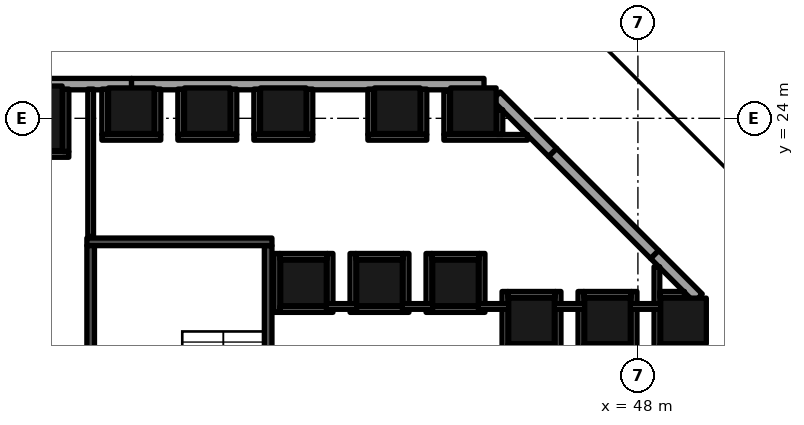
"""IFC4 building model, lengths in metres.
Left out: names, types, materials, properties, quantities, classifications, styles, units other than length and angle.
Written with IfcOpenShell. Run it as: python <this file> out.ifc"""

import sys

from ifc_helpers import new_model, si_unit, direction, frame, frame_2d, origin, origin_2d, place, context, subcontext, project, spatial, rectangle, extrude, element, fill, save


model = new_model("IFC4")
c1 = context("Model", 3, precision=1e-05, world=origin(), true_north=direction((0.0, 1.0)))
c2 = subcontext(c1, "Body", "Model", "MODEL_VIEW")
j1 = project(units=[si_unit("LENGTHUNIT", "METRE"), si_unit("PLANEANGLEUNIT", "RADIAN")], contexts=[c1])
p1 = place(None, origin())
s1 = spatial("IfcSite", under=j1, at=p1, CompositionType="ELEMENT")
p2 = place(p1, origin())
s2 = spatial("IfcBuilding", under=s1, at=p2, CompositionType="ELEMENT")
p3 = place(p2, origin())
s3 = spatial("IfcBuildingStorey", under=s2, at=p3, CompositionType="ELEMENT", Elevation=0.0)
p4 = place(p3, frame((32.0, 24.0, 0.0), z_axis=(0.0, 0.0, 1.0), x_axis=(1.0, 0.0, 0.0)))
e1 = element("IfcColumn", 1, at=p4, inside=s3, PredefinedType="COLUMN", context=c2, shape_type="SweptSolid", body=[
    extrude(rectangle(XDim=1.7, YDim=1.7, at=origin_2d()), origin(), (0.0, 0.0, 1.0), 9.0),
])
for number, where, z_axis, x_axis in (
    (2, (34.669, 24.2, 0.0), (0.0, 0.0, 1.0), (1.0, 0.0, 0.0)),
    (3, (39.2, 19.669, 0.0), (0.0, 0.0, 1.0), (1.0, 0.0, 0.0)),
    (4, (36.669, 24.2, 0.0), (0.0, 0.0, 1.0), (1.0, 0.0, 0.0)),
    (5, (41.2, 19.669, 0.0), (0.0, 0.0, 1.0), (1.0, 0.0, 0.0)),
    (6, (38.669, 24.2, 0.0), (0.0, 0.0, 1.0), (1.0, 0.0, 0.0)),
    (7, (43.2, 19.669, 0.0), (0.0, 0.0, 1.0), (1.0, 0.0, 0.0)),
    (8, (45.2, 18.669, 0.0), (0.0, 0.0, 1.0), (1.0, 0.0, 0.0)),
    (9, (41.669, 24.2, 0.0), (0.0, 0.0, 1.0), (1.0, 0.0, 0.0)),
    (10, (47.2, 18.669, 0.0), (0.0, 0.0, 1.0), (1.0, 0.0, 0.0)),
    (11, (43.669, 24.2, 0.0), (0.0, 0.0, 1.0), (1.0, 0.0, 0.0)),
    (12, (49.2, 18.669, 0.0), (0.0, 0.0, 1.0), (1.0, 0.0, 0.0)),
):
    element("IfcColumn", number, at=place(p3, frame(where, z_axis=z_axis, x_axis=x_axis)), inside=s3, PredefinedType="COLUMN", context=c2, shape_type="SweptSolid", body=[
        extrude(rectangle(XDim=1.2, YDim=1.2, at=origin_2d()), origin(), (0.0, 0.0, 1.0), 9.0),
    ])
p5 = place(p3, frame((48.442, 20.417, 0.0), z_axis=(0.0, 0.0, 1.0), x_axis=(-0.707106781187, 0.707106781187, 0.0)))
e13 = element("IfcWall", 13, at=p5, inside=s3, PredefinedType="ELEMENTEDWALL", context=c2, shape_type="SweptSolid", body=[
    extrude(rectangle(XDim=3.8, YDim=0.3, at=frame_2d((1.9, 0.0))), origin(), (0.0, 0.0, 1.0), 7.6),
])
p6 = place(p5, frame((0.4, 0.0, 0.0)))
e14 = element("IfcOpeningElement", 14, at=p6, cuts=e13, PredefinedType="OPENING", context=c2, shape_type="SweptSolid", body=[
    extrude(rectangle(XDim=3.0, YDim=2.7, at=frame_2d((1.5, 1.35))), frame((0.0, 0.16, 0.0), z_axis=(0.0, -1.0, 0.0), x_axis=(1.0, 0.0, 0.0)), (0.0, 0.0, 1.0), 0.32),
])
p7 = place(p3, frame((49.588, 19.271, 0.0), z_axis=(0.0, 0.0, 1.0), x_axis=(-0.707106781187, 0.707106781187, 0.0)))
e15 = element("IfcWall", 15, at=p7, inside=s3, PredefinedType="SOLIDWALL", context=c2, shape_type="SweptSolid", body=[
    extrude(rectangle(XDim=1.62, YDim=0.3, at=frame_2d((0.81, 0.0))), origin(), (0.0, 0.0, 1.0), 7.6),
])
p8 = place(p3, frame((45.755, 23.104, 0.0), z_axis=(0.0, 0.0, 1.0), x_axis=(-0.707106781187, 0.707106781187, 0.0)))
e16 = element("IfcWall", 16, at=p8, inside=s3, PredefinedType="SOLIDWALL", context=c2, shape_type="SweptSolid", body=[
    extrude(rectangle(XDim=2.099, YDim=0.3, at=frame_2d((1.049, 0.0))), origin(), (0.0, 0.0, 1.0), 7.6),
])
p9 = place(p3, frame((43.95, 24.9, 0.0), z_axis=(0.0, 0.0, 1.0), x_axis=(-1.0, 0.0, 0.0)))
e17 = element("IfcWall", 17, at=p9, inside=s3, PredefinedType="SOLIDWALL", context=c2, shape_type="SweptSolid", body=[
    extrude(rectangle(XDim=9.277, YDim=0.3, at=frame_2d((4.638, 0.0))), origin(), (0.0, 0.0, 1.0), 7.6),
])
p10 = place(p3, frame((34.673, 24.9, 0.0), z_axis=(0.0, 0.0, 1.0), x_axis=(-1.0, 0.0, 0.0)))
e18 = element("IfcWall", 18, at=p10, inside=s3, PredefinedType="SOLIDWALL", context=c2, shape_type="SweptSolid", body=[
    extrude(rectangle(XDim=9.277, YDim=0.3, at=frame_2d((4.639, 0.0))), origin(), (0.0, 0.0, 1.0), 7.6),
])
p11 = place(p3, frame((49.85, 4.302, 9.0), z_axis=(0.0, 0.0, 1.0), x_axis=(0.0, 1.0, 0.0)))
e19 = element("IfcWall", 19, at=p11, inside=s3, PredefinedType="PARAPET", context=c2, shape_type="SweptSolid", body=[
    extrude(rectangle(XDim=14.698, YDim=0.3, at=frame_2d((7.349, 0.0))), origin(), (0.0, 0.0, 1.0), 1.1),
])
p12 = place(p3, frame((49.745, 19.042, 9.0), z_axis=(0.0, 0.0, 1.0), x_axis=(-0.707092029666, 0.7071215324, 0.0)))
e20 = element("IfcWall", 20, at=p12, inside=s3, PredefinedType="PARAPET", context=c2, shape_type="SweptSolid", body=[
    extrude(rectangle(XDim=8.275, YDim=0.3, at=frame_2d((4.138, 0.0))), origin(), (0.0, 0.0, 1.0), 1.1),
])
p13 = place(p3, frame((43.79, 24.85, 9.0), z_axis=(0.0, 0.0, 1.0), x_axis=(-1.0, 0.0, 0.0)))
e21 = element("IfcWall", 21, at=p13, inside=s3, PredefinedType="PARAPET", context=c2, shape_type="SweptSolid", body=[
    extrude(rectangle(XDim=1.04, YDim=0.3, at=frame_2d((0.52, 0.0))), origin(), (0.0, 0.0, 1.0), 1.1),
])
p14 = place(p3, frame((33.5, 20.75, 0.0), z_axis=(0.0, 0.0, 1.0), x_axis=(1.0, 0.0, 0.0)))
e22 = element("IfcWall", 22, at=p14, inside=s3, PredefinedType="SOLIDWALL", context=c2, shape_type="SweptSolid", body=[
    extrude(rectangle(XDim=4.87, YDim=0.2, at=frame_2d((2.435, 0.0))), origin(), (0.0, 0.0, 1.0), 8.5),
])
p15 = place(p3, frame((33.6, 14.0, 0.0), z_axis=(0.0, 0.0, 1.0), x_axis=(0.0, 1.0, 0.0)))
e23 = element("IfcWall", 23, at=p15, inside=s3, PredefinedType="SOLIDWALL", context=c2, shape_type="SweptSolid", body=[
    extrude(rectangle(XDim=6.65, YDim=0.2, at=frame_2d((3.325, 0.0))), origin(), (0.0, 0.0, 1.0), 8.5),
])
p16 = place(p15, frame((0.1, 0.0, 0.0)))
e24 = element("IfcOpeningElement", 24, at=p16, cuts=e23, PredefinedType="OPENING", context=c2, shape_type="SweptSolid", body=[
    extrude(rectangle(XDim=1.8, YDim=2.4, at=frame_2d((0.9, 1.2))), frame((0.0, 0.11, 0.0), z_axis=(0.0, -1.0, 0.0), x_axis=(1.0, 0.0, 0.0)), (0.0, 0.0, 1.0), 0.22),
])
p17 = place(p3, frame((38.27, 14.0, 0.0), z_axis=(0.0, 0.0, 1.0), x_axis=(0.0, 1.0, 0.0)))
e25 = element("IfcWall", 25, at=p17, inside=s3, PredefinedType="SOLIDWALL", context=c2, shape_type="SweptSolid", body=[
    extrude(rectangle(XDim=6.65, YDim=0.2, at=frame_2d((3.325, 0.0))), origin(), (0.0, 0.0, 1.0), 8.5),
])
p18 = place(p17, frame((0.1, 0.0, 0.0)))
e26 = element("IfcOpeningElement", 26, at=p18, cuts=e25, PredefinedType="OPENING", context=c2, shape_type="SweptSolid", body=[
    extrude(rectangle(XDim=1.8, YDim=2.4, at=frame_2d((0.9, 1.2))), frame((0.0, 0.11, 0.0), z_axis=(0.0, -1.0, 0.0), x_axis=(1.0, 0.0, 0.0)), (0.0, 0.0, 1.0), 0.22),
])
for number, where, z_axis, x_axis in (
    (27, (44.5, 17.894, 0.0), (0.0, 0.0, 1.0), (0.0, 1.0, 0.0)),
    (28, (45.9, 17.894, 0.0), (0.0, 0.0, 1.0), (0.0, 1.0, 0.0)),
    (29, (46.5, 17.894, 0.0), (0.0, 0.0, 1.0), (0.0, 1.0, 0.0)),
):
    element("IfcWall", number, at=place(p3, frame(where, z_axis=z_axis, x_axis=x_axis)), inside=s3, PredefinedType="PARTITIONING", context=c2, shape_type="SweptSolid", body=[
        extrude(rectangle(XDim=1.55, YDim=0.15, at=frame_2d((0.775, 0.0))), origin(), (0.0, 0.0, 1.0), 8.5),
    ])
p19 = place(p3, frame((47.9, 17.894, 0.0), z_axis=(0.0, 0.0, 1.0), x_axis=(0.0, 1.0, 0.0)))
e30 = element("IfcWall", 30, at=p19, inside=s3, PredefinedType="PARTITIONING", context=c2, shape_type="SweptSolid", body=[
    extrude(rectangle(XDim=1.55, YDim=0.15, at=frame_2d((0.775, 0.0))), origin(), (0.0, 0.0, 1.0), 7.6),
])
p20 = place(p3, frame((48.5, 17.894, 0.0), z_axis=(0.0, 0.0, 1.0), x_axis=(0.0, 1.0, 0.0)))
e31 = element("IfcWall", 31, at=p20, inside=s3, PredefinedType="PARTITIONING", context=c2, shape_type="SweptSolid", body=[
    extrude(rectangle(XDim=2.202, YDim=0.15, at=frame_2d((1.101, 0.0))), origin(), (0.0, 0.0, 1.0), 8.5),
])
p21 = place(p3, frame((38.5, 18.894, 0.0), z_axis=(0.0, 0.0, 1.0), x_axis=(0.0, 1.0, 0.0)))
e32 = element("IfcWall", 32, at=p21, inside=s3, PredefinedType="PARTITIONING", context=c2, shape_type="SweptSolid", body=[
    extrude(rectangle(XDim=1.55, YDim=0.15, at=frame_2d((0.775, 0.0))), origin(), (0.0, 0.0, 1.0), 8.5),
])
p22 = place(p3, frame((38.575, 18.969, 0.0), z_axis=(0.0, 0.0, 1.0), x_axis=(1.0, 0.0, 0.0)))
e33 = element("IfcWall", 33, at=p22, inside=s3, PredefinedType="PARTITIONING", context=c2, shape_type="SweptSolid", body=[
    extrude(rectangle(XDim=1.25, YDim=0.15, at=frame_2d((0.625, 0.0))), origin(), (0.0, 0.0, 1.0), 8.5),
])
for number, where, z_axis, x_axis in (
    (34, (39.9, 18.894, 0.0), (0.0, 0.0, 1.0), (0.0, 1.0, 0.0)),
    (35, (40.5, 18.894, 0.0), (0.0, 0.0, 1.0), (0.0, 1.0, 0.0)),
):
    element("IfcWall", number, at=place(p3, frame(where, z_axis=z_axis, x_axis=x_axis)), inside=s3, PredefinedType="PARTITIONING", context=c2, shape_type="SweptSolid", body=[
        extrude(rectangle(XDim=1.55, YDim=0.15, at=frame_2d((0.775, 0.0))), origin(), (0.0, 0.0, 1.0), 8.5),
    ])
p23 = place(p3, frame((40.575, 18.969, 0.0), z_axis=(0.0, 0.0, 1.0), x_axis=(1.0, 0.0, 0.0)))
e36 = element("IfcWall", 36, at=p23, inside=s3, PredefinedType="PARTITIONING", context=c2, shape_type="SweptSolid", body=[
    extrude(rectangle(XDim=1.25, YDim=0.15, at=frame_2d((0.625, 0.0))), origin(), (0.0, 0.0, 1.0), 8.5),
])
for number, where, z_axis, x_axis in (
    (37, (41.9, 18.894, 0.0), (0.0, 0.0, 1.0), (0.0, 1.0, 0.0)),
    (38, (42.5, 18.894, 0.0), (0.0, 0.0, 1.0), (0.0, 1.0, 0.0)),
):
    element("IfcWall", number, at=place(p3, frame(where, z_axis=z_axis, x_axis=x_axis)), inside=s3, PredefinedType="PARTITIONING", context=c2, shape_type="SweptSolid", body=[
        extrude(rectangle(XDim=1.55, YDim=0.15, at=frame_2d((0.775, 0.0))), origin(), (0.0, 0.0, 1.0), 8.5),
    ])
p24 = place(p3, frame((42.575, 18.969, 0.0), z_axis=(0.0, 0.0, 1.0), x_axis=(1.0, 0.0, 0.0)))
e39 = element("IfcWall", 39, at=p24, inside=s3, PredefinedType="PARTITIONING", context=c2, shape_type="SweptSolid", body=[
    extrude(rectangle(XDim=1.25, YDim=0.15, at=frame_2d((0.625, 0.0))), origin(), (0.0, 0.0, 1.0), 8.5),
])
p25 = place(p3, frame((43.9, 18.894, 0.0), z_axis=(0.0, 0.0, 1.0), x_axis=(0.0, 1.0, 0.0)))
e40 = element("IfcWall", 40, at=p25, inside=s3, PredefinedType="PARTITIONING", context=c2, shape_type="SweptSolid", body=[
    extrude(rectangle(XDim=1.55, YDim=0.15, at=frame_2d((0.775, 0.0))), origin(), (0.0, 0.0, 1.0), 8.5),
])
for number, where, z_axis, x_axis in (
    (41, (39.8, 19.05, 0.0), (0.0, 0.0, 1.0), (1.0, 0.0, 0.0)),
    (42, (41.8, 19.05, 0.0), (0.0, 0.0, 1.0), (1.0, 0.0, 0.0)),
    (43, (43.8, 19.05, 0.0), (0.0, 0.0, 1.0), (1.0, 0.0, 0.0)),
    (44, (45.8, 19.05, 0.0), (0.0, 0.0, 1.0), (1.0, 0.0, 0.0)),
    (45, (47.8, 19.05, 0.0), (0.0, 0.0, 1.0), (1.0, 0.0, 0.0)),
):
    element("IfcWall", number, at=place(p3, frame(where, z_axis=z_axis, x_axis=x_axis)), inside=s3, PredefinedType="PARTITIONING", context=c2, shape_type="SweptSolid", body=[
        extrude(rectangle(XDim=0.8, YDim=0.15, at=frame_2d((0.4, 0.0))), origin(), (0.0, 0.0, 1.0), 8.5),
    ])
p26 = place(p3, frame((44.575, 19.369, 0.0), z_axis=(0.0, 0.0, 1.0), x_axis=(1.0, 0.0, 0.0)))
e46 = element("IfcWall", 46, at=p26, inside=s3, PredefinedType="PARTITIONING", context=c2, shape_type="SweptSolid", body=[
    extrude(rectangle(XDim=1.25, YDim=0.15, at=frame_2d((0.625, 0.0))), origin(), (0.0, 0.0, 1.0), 8.5),
])
p27 = place(p3, frame((46.575, 19.369, 0.0), z_axis=(0.0, 0.0, 1.0), x_axis=(1.0, 0.0, 0.0)))
e47 = element("IfcWall", 47, at=p27, inside=s3, PredefinedType="PARTITIONING", context=c2, shape_type="SweptSolid", body=[
    extrude(rectangle(XDim=1.25, YDim=0.15, at=frame_2d((0.625, 0.0))), origin(), (0.0, 0.0, 1.0), 7.6),
])
p28 = place(p3, frame((48.575, 19.369, 0.0), z_axis=(0.0, 0.0, 1.0), x_axis=(1.0, 0.0, 0.0)))
e48 = element("IfcWall", 48, at=p28, inside=s3, PredefinedType="PARTITIONING", context=c2, shape_type="SweptSolid", body=[
    extrude(rectangle(XDim=0.652, YDim=0.15, at=frame_2d((0.326, 0.0))), origin(), (0.0, 0.0, 1.0), 8.5),
])
for number, where, z_axis, x_axis in (
    (49, (38.575, 20.369, 0.0), (0.0, 0.0, 1.0), (1.0, 0.0, 0.0)),
    (50, (40.575, 20.369, 0.0), (0.0, 0.0, 1.0), (1.0, 0.0, 0.0)),
    (51, (42.575, 20.369, 0.0), (0.0, 0.0, 1.0), (1.0, 0.0, 0.0)),
):
    element("IfcWall", number, at=place(p3, frame(where, z_axis=z_axis, x_axis=x_axis)), inside=s3, PredefinedType="PARTITIONING", context=c2, shape_type="SweptSolid", body=[
        extrude(rectangle(XDim=1.25, YDim=0.15, at=frame_2d((0.625, 0.0))), origin(), (0.0, 0.0, 1.0), 8.5),
    ])
p29 = place(p3, frame((33.6, 20.89, 0.0), z_axis=(0.0, 0.0, 1.0), x_axis=(0.0, 1.0, 0.0)))
e52 = element("IfcWall", 52, at=p29, inside=s3, PredefinedType="PARTITIONING", context=c2, shape_type="SweptSolid", body=[
    extrude(rectangle(XDim=3.88, YDim=0.15, at=frame_2d((1.94, 0.0))), origin(), (0.0, 0.0, 1.0), 7.6),
])
p30 = place(p29, frame((0.61, 0.0, 0.0)))
e53 = element("IfcOpeningElement", 53, at=p30, cuts=e52, PredefinedType="OPENING", context=c2, shape_type="SweptSolid", body=[
    extrude(rectangle(XDim=1.2, YDim=2.1, at=frame_2d((0.6, 1.05))), frame((0.0, 0.085, 0.0), z_axis=(0.0, -1.0, 0.0), x_axis=(1.0, 0.0, 0.0)), (0.0, 0.0, 1.0), 0.17),
])
p31 = place(p3, frame((30.975, 23.05, 0.0), z_axis=(0.0, 0.0, 1.0), x_axis=(1.0, 0.0, 0.0)))
e54 = element("IfcWall", 54, at=p31, inside=s3, PredefinedType="PARTITIONING", context=c2, shape_type="SweptSolid", body=[
    extrude(rectangle(XDim=2.05, YDim=0.15, at=frame_2d((1.025, 0.0))), origin(), (0.0, 0.0, 1.0), 7.3),
])
p32 = place(p3, frame((32.95, 23.125, 0.0), z_axis=(0.0, 0.0, 1.0), x_axis=(0.0, 1.0, 0.0)))
e55 = element("IfcWall", 55, at=p32, inside=s3, PredefinedType="PARTITIONING", context=c2, shape_type="SweptSolid", body=[
    extrude(rectangle(XDim=1.645, YDim=0.15, at=frame_2d((0.823, 0.0))), origin(), (0.0, 0.0, 1.0), 7.6),
])
for number, where, z_axis, x_axis in (
    (56, (33.894, 23.5, 0.0), (0.0, 0.0, 1.0), (1.0, 0.0, 0.0)),
    (57, (35.894, 23.5, 0.0), (0.0, 0.0, 1.0), (1.0, 0.0, 0.0)),
    (58, (37.894, 23.5, 0.0), (0.0, 0.0, 1.0), (1.0, 0.0, 0.0)),
    (59, (40.894, 23.5, 0.0), (0.0, 0.0, 1.0), (1.0, 0.0, 0.0)),
):
    element("IfcWall", number, at=place(p3, frame(where, z_axis=z_axis, x_axis=x_axis)), inside=s3, PredefinedType="PARTITIONING", context=c2, shape_type="SweptSolid", body=[
        extrude(rectangle(XDim=1.55, YDim=0.15, at=frame_2d((0.775, 0.0))), origin(), (0.0, 0.0, 1.0), 8.5),
    ])
p33 = place(p3, frame((42.894, 23.5, 0.0), z_axis=(0.0, 0.0, 1.0), x_axis=(1.0, 0.0, 0.0)))
e60 = element("IfcWall", 60, at=p33, inside=s3, PredefinedType="PARTITIONING", context=c2, shape_type="SweptSolid", body=[
    extrude(rectangle(XDim=2.202, YDim=0.15, at=frame_2d((1.101, 0.0))), origin(), (0.0, 0.0, 1.0), 7.6),
])
p34 = place(p3, frame((33.969, 23.575, 0.0), z_axis=(0.0, 0.0, 1.0), x_axis=(0.0, 1.0, 0.0)))
e61 = element("IfcWall", 61, at=p34, inside=s3, PredefinedType="PARTITIONING", context=c2, shape_type="SweptSolid", body=[
    extrude(rectangle(XDim=1.195, YDim=0.15, at=frame_2d((0.598, 0.0))), origin(), (0.0, 0.0, 1.0), 7.6),
])
for number, where, z_axis, x_axis in (
    (62, (35.369, 23.575, 0.0), (0.0, 0.0, 1.0), (0.0, 1.0, 0.0)),
    (63, (35.969, 23.575, 0.0), (0.0, 0.0, 1.0), (0.0, 1.0, 0.0)),
    (64, (37.369, 23.575, 0.0), (0.0, 0.0, 1.0), (0.0, 1.0, 0.0)),
    (65, (37.969, 23.575, 0.0), (0.0, 0.0, 1.0), (0.0, 1.0, 0.0)),
):
    element("IfcWall", number, at=place(p3, frame(where, z_axis=z_axis, x_axis=x_axis)), inside=s3, PredefinedType="PARTITIONING", context=c2, shape_type="SweptSolid", body=[
        extrude(rectangle(XDim=1.195, YDim=0.15, at=frame_2d((0.598, 0.0))), origin(), (0.0, 0.0, 1.0), 8.5),
    ])
for number, where, z_axis, x_axis in (
    (66, (39.369, 23.575, 0.0), (0.0, 0.0, 1.0), (0.0, 1.0, 0.0)),
    (67, (40.969, 23.575, 0.0), (0.0, 0.0, 1.0), (0.0, 1.0, 0.0)),
):
    element("IfcWall", number, at=place(p3, frame(where, z_axis=z_axis, x_axis=x_axis)), inside=s3, PredefinedType="PARTITIONING", context=c2, shape_type="SweptSolid", body=[
        extrude(rectangle(XDim=1.195, YDim=0.15, at=frame_2d((0.598, 0.0))), origin(), (0.0, 0.0, 1.0), 7.3),
    ])
p35 = place(p3, frame((42.369, 23.575, 0.0), z_axis=(0.0, 0.0, 1.0), x_axis=(0.0, 1.0, 0.0)))
e68 = element("IfcWall", 68, at=p35, inside=s3, PredefinedType="PARTITIONING", context=c2, shape_type="SweptSolid", body=[
    extrude(rectangle(XDim=1.195, YDim=0.15, at=frame_2d((0.598, 0.0))), origin(), (0.0, 0.0, 1.0), 8.5),
])
p36 = place(p3, frame((42.969, 23.575, 0.0), z_axis=(0.0, 0.0, 1.0), x_axis=(0.0, 1.0, 0.0)))
e69 = element("IfcWall", 69, at=p36, inside=s3, PredefinedType="PARTITIONING", context=c2, shape_type="SweptSolid", body=[
    extrude(rectangle(XDim=1.145, YDim=0.15, at=frame_2d((0.573, 0.0))), origin(), (0.0, 0.0, 1.0), 8.5),
])
p37 = place(p3, frame((44.369, 23.575, 0.0), z_axis=(0.0, 0.0, 1.0), x_axis=(0.0, 1.0, 0.0)))
e70 = element("IfcWall", 70, at=p37, inside=s3, PredefinedType="PARTITIONING", context=c2, shape_type="SweptSolid", body=[
    extrude(rectangle(XDim=0.652, YDim=0.15, at=frame_2d((0.326, 0.0))), origin(), (0.0, 0.0, 1.0), 8.5),
])
p38 = place(p6, origin())
e71 = element("IfcDoor", 71, at=p38, inside=s3, OperationType="DOUBLE_DOOR_SINGLE_SWING", PredefinedType="DOOR", context=c2, shape_type="SweptSolid", body=[
    extrude(rectangle(XDim=3.0, YDim=2.7, at=frame_2d((1.5, 1.35))), frame((0.0, 0.025, 0.0), z_axis=(0.0, -1.0, 0.0), x_axis=(1.0, 0.0, 0.0)), (0.0, 0.0, 1.0), 0.05),
])
fill(e14, e71)
p39 = place(p30, origin())
e72 = element("IfcDoor", 72, at=p39, inside=s3, OperationType="SINGLE_SWING_LEFT", PredefinedType="DOOR", context=c2, shape_type="SweptSolid", body=[
    extrude(rectangle(XDim=1.2, YDim=2.1, at=frame_2d((0.6, 1.05))), frame((0.0, 0.025, 0.0), z_axis=(0.0, -1.0, 0.0), x_axis=(1.0, 0.0, 0.0)), (0.0, 0.0, 1.0), 0.05),
])
fill(e53, e72)
save(model, sys.argv[1])
